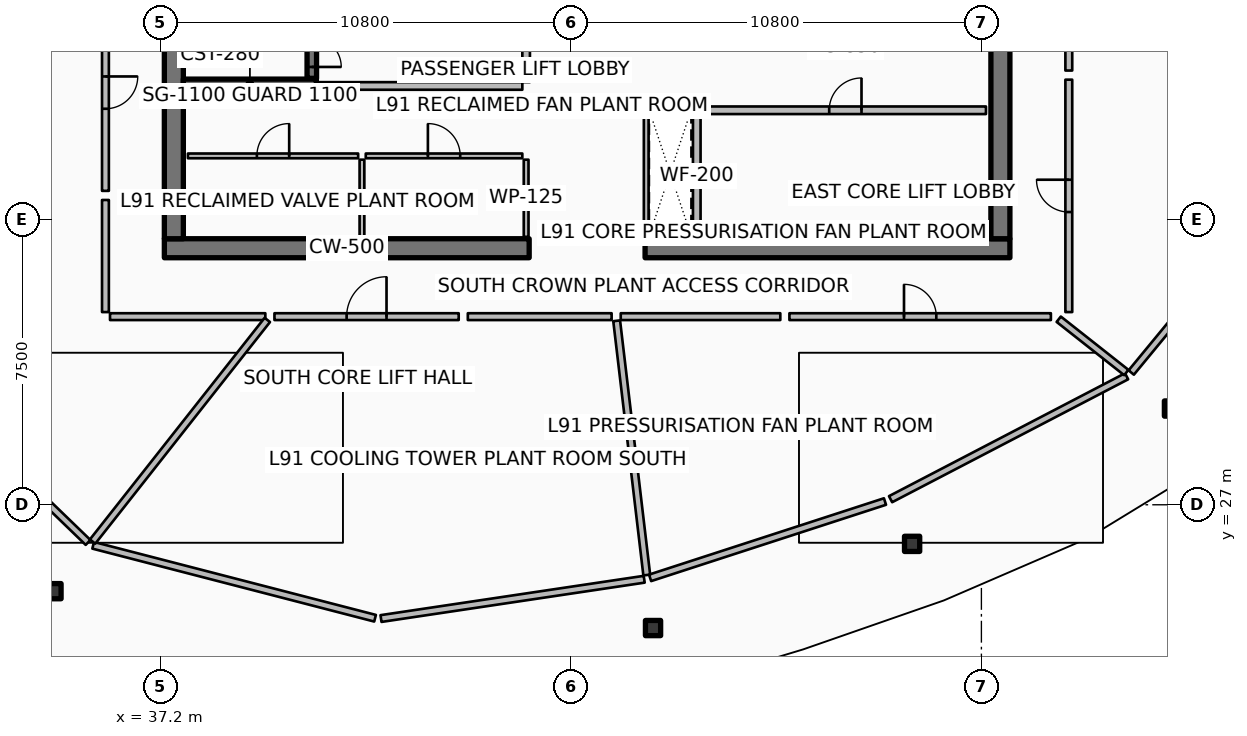
"""IFC4 building model, lengths in metres.
Left out: names, types, materials, properties, quantities, classifications, styles, units other than length and angle.
Written with IfcOpenShell. Run it as: python <this file> out.ifc"""

import sys

from ifc_helpers import new_model, si_unit, direction, frame, frame_2d, origin, origin_2d, place, context, subcontext, project, spatial, rectangle, hollow_rectangle, extrude, element, fill, save


model = new_model("IFC4")
c1 = context("Model", 3, precision=1e-05, world=origin(), true_north=direction((0.0, 1.0)))
c2 = subcontext(c1, "Body", "Model", "MODEL_VIEW")
j1 = project(units=[si_unit("LENGTHUNIT", "METRE"), si_unit("PLANEANGLEUNIT", "RADIAN")], contexts=[c1])
p1 = place(None, origin())
s1 = spatial("IfcSite", under=j1, at=p1, CompositionType="ELEMENT")
p2 = place(p1, origin())
s2 = spatial("IfcBuilding", under=s1, at=p2, CompositionType="ELEMENT")
p3 = place(p2, frame((0.0, 0.0, 363.2)))
s3 = spatial("IfcBuildingStorey", under=s2, at=p3, CompositionType="ELEMENT", Elevation=363.2)
p4 = place(p3, frame((37.3, 33.75, 0.0), z_axis=(0.0, 0.0, 1.0), x_axis=(1.0, 0.0, 0.0)))
e1 = element("IfcWall", 1, at=p4, inside=s3, PredefinedType="SHEAR", context=c2, shape_type="SweptSolid", body=[
    extrude(rectangle(XDim=9.6, YDim=0.5, at=frame_2d((4.8, 0.0))), origin(), (0.0, 0.0, 1.0), 3.6),
])
p5 = place(p3, frame((49.95, 33.75, 0.0), z_axis=(0.0, 0.0, 1.0), x_axis=(1.0, 0.0, 0.0)))
e2 = element("IfcWall", 2, at=p5, inside=s3, PredefinedType="SHEAR", context=c2, shape_type="SweptSolid", body=[
    extrude(rectangle(XDim=9.6, YDim=0.5, at=frame_2d((4.8, 0.0))), origin(), (0.0, 0.0, 1.0), 3.6),
])
for number, where, z_axis, x_axis in (
    (3, (37.55, 34.0, 0.0), (0.0, 0.0, 1.0), (0.0, 1.0, 0.0)),
    (4, (59.3, 34.0, 0.0), (0.0, 0.0, 1.0), (0.0, 1.0, 0.0)),
):
    element("IfcWall", number, at=place(p3, frame(where, z_axis=z_axis, x_axis=x_axis)), inside=s3, PredefinedType="SHEAR", context=c2, shape_type="SweptSolid", body=[
        extrude(rectangle(XDim=16.0, YDim=0.5, at=frame_2d((8.0, 0.0))), origin(), (0.0, 0.0, 1.0), 3.6),
    ])
p6 = place(p3, frame((37.8, 38.06, 0.0), z_axis=(0.0, 0.0, 1.0), x_axis=(1.0, 0.0, 0.0)))
e5 = element("IfcWall", 5, at=p6, inside=s3, PredefinedType="SHEAR", context=c2, shape_type="SweptSolid", body=[
    extrude(rectangle(XDim=3.5, YDim=0.28, at=frame_2d((1.75, 0.0))), origin(), (0.0, 0.0, 1.0), 3.6),
])
for number, where, z_axis, x_axis in (
    (6, (34.383, 24.726, 0.0), (0.0, 0.0, 1.0), (1.0, 0.0, 0.0)),
    (7, (50.159, 23.756, 0.0), (0.0, 0.0, 1.0), (1.0, 0.0, 0.0)),
    (8, (56.977, 25.971, 0.0), (0.0, 0.0, 1.0), (1.0, 0.0, 0.0)),
    (9, (63.815, 29.532, 0.0), (0.0, 0.0, 1.0), (1.0, 0.0, 0.0)),
):
    element("IfcColumn", number, at=place(p3, frame(where, z_axis=z_axis, x_axis=x_axis)), inside=s3, PredefinedType="COLUMN", context=c2, shape_type="SweptSolid", body=[
        extrude(hollow_rectangle(XDim=0.4, YDim=0.4, WallThickness=0.02, InnerFilletRadius=0.02, OuterFilletRadius=0.04, at=origin_2d()), origin(), (0.0, 0.0, 1.0), 3.32),
    ])
p7 = place(p3, frame((41.18, 38.22, 0.0), z_axis=(0.0, 0.0, 1.0), x_axis=(0.0, 1.0, 0.0)))
e10 = element("IfcWall", 10, at=p7, inside=s3, PredefinedType="SOLIDWALL", context=c2, shape_type="SweptSolid", body=[
    extrude(rectangle(XDim=7.56, YDim=0.25, at=frame_2d((3.78, 0.0))), origin(), (0.0, 0.0, 1.0), 3.32),
])
p8 = place(p7, frame((0.3, 0.0, 0.0)))
e11 = element("IfcOpeningElement", 11, at=p8, cuts=e10, PredefinedType="OPENING", context=c2, shape_type="SweptSolid", body=[
    extrude(rectangle(XDim=1.55, YDim=2.15, at=frame_2d((0.775, 1.075))), frame((0.0, 0.135, 0.0), z_axis=(0.0, -1.0, 0.0), x_axis=(1.0, 0.0, 0.0)), (0.0, 0.0, 1.0), 0.27),
])
p9 = place(p3, frame((51.52, 37.38, 0.0), z_axis=(0.0, 0.0, 1.0), x_axis=(1.0, 0.0, 0.0)))
e12 = element("IfcWall", 12, at=p9, inside=s3, PredefinedType="PARTITIONING", context=c2, shape_type="SweptSolid", body=[
    extrude(rectangle(XDim=7.4, YDim=0.2, at=frame_2d((3.7, 0.0))), origin(), (0.0, 0.0, 1.0), 3.32),
])
p10 = place(p9, frame((3.275, 0.0, 0.0)))
e13 = element("IfcOpeningElement", 13, at=p10, cuts=e12, PredefinedType="OPENING", context=c2, shape_type="SweptSolid", body=[
    extrude(rectangle(XDim=0.85, YDim=2.06, at=frame_2d((0.425, 1.03))), frame((0.0, 0.11, 0.0), z_axis=(0.0, -1.0, 0.0), x_axis=(1.0, 0.0, 0.0)), (0.0, 0.0, 1.0), 0.22),
])
p11 = place(p3, frame((51.31, 34.05, 0.0), z_axis=(0.0, 0.0, 1.0), x_axis=(0.0, 1.0, 0.0)))
e14 = element("IfcWall", 14, at=p11, inside=s3, PredefinedType="PARTITIONING", context=c2, shape_type="SweptSolid", body=[
    extrude(rectangle(XDim=3.21, YDim=0.2, at=frame_2d((1.605, 0.0))), origin(), (0.0, 0.0, 1.0), 3.32),
])
for number, where, z_axis, x_axis in (
    (15, (46.82, 34.05, 0.0), (0.0, 0.0, 1.0), (0.0, 1.0, 0.0)),
    (16, (42.5, 34.05, 0.0), (0.0, 0.0, 1.0), (0.0, 1.0, 0.0)),
):
    element("IfcWall", number, at=place(p3, frame(where, z_axis=z_axis, x_axis=x_axis)), inside=s3, PredefinedType="PARTITIONING", context=c2, shape_type="SweptSolid", body=[
        extrude(rectangle(XDim=2.03, YDim=0.125, at=frame_2d((1.015, 0.0))), origin(), (0.0, 0.0, 1.0), 2.76),
    ])
p12 = place(p3, frame((37.92, 36.18, 0.0), z_axis=(0.0, 0.0, 1.0), x_axis=(1.0, 0.0, 0.0)))
e17 = element("IfcWall", 17, at=p12, inside=s3, PredefinedType="PARTITIONING", context=c2, shape_type="SweptSolid", body=[
    extrude(rectangle(XDim=4.48, YDim=0.125, at=frame_2d((2.24, 0.0))), origin(), (0.0, 0.0, 1.0), 2.76),
])
p13 = place(p12, frame((1.815, 0.0, 0.0)))
e18 = element("IfcOpeningElement", 18, at=p13, cuts=e17, PredefinedType="OPENING", context=c2, shape_type="SweptSolid", body=[
    extrude(rectangle(XDim=0.85, YDim=2.06, at=frame_2d((0.425, 1.03))), frame((0.0, 0.073, 0.0), z_axis=(0.0, -1.0, 0.0), x_axis=(1.0, 0.0, 0.0)), (0.0, 0.0, 1.0), 0.145),
])
p14 = place(p3, frame((42.6, 36.18, 0.0), z_axis=(0.0, 0.0, 1.0), x_axis=(1.0, 0.0, 0.0)))
e19 = element("IfcWall", 19, at=p14, inside=s3, PredefinedType="PARTITIONING", context=c2, shape_type="SweptSolid", body=[
    extrude(rectangle(XDim=4.12, YDim=0.125, at=frame_2d((2.06, 0.0))), origin(), (0.0, 0.0, 1.0), 2.76),
])
p15 = place(p14, frame((1.635, 0.0, 0.0)))
e20 = element("IfcOpeningElement", 20, at=p15, cuts=e19, PredefinedType="OPENING", context=c2, shape_type="SweptSolid", body=[
    extrude(rectangle(XDim=0.85, YDim=2.06, at=frame_2d((0.425, 1.03))), frame((0.0, 0.073, 0.0), z_axis=(0.0, -1.0, 0.0), x_axis=(1.0, 0.0, 0.0)), (0.0, 0.0, 1.0), 0.145),
])
p16 = place(p3, frame((41.35, 38.02, 0.0), z_axis=(0.0, 0.0, 1.0), x_axis=(1.0, 0.0, 0.0)))
e21 = element("IfcWall", 21, at=p16, inside=s3, PredefinedType="PARTITIONING", context=c2, shape_type="SweptSolid", body=[
    extrude(rectangle(XDim=5.37, YDim=0.2, at=frame_2d((2.685, 0.0))), origin(), (0.0, 0.0, 1.0), 3.32),
])
p17 = place(p3, frame((46.82, 38.12, 0.0), z_axis=(0.0, 0.0, 1.0), x_axis=(0.0, 1.0, 0.0)))
e22 = element("IfcWall", 22, at=p17, inside=s3, PredefinedType="PARTITIONING", context=c2, shape_type="SweptSolid", body=[
    extrude(rectangle(XDim=3.26, YDim=0.2, at=frame_2d((1.63, 0.0))), origin(), (0.0, 0.0, 1.0), 3.32),
])
p18 = place(p17, frame((1.105, 0.0, 0.0)))
e23 = element("IfcOpeningElement", 23, at=p18, cuts=e22, PredefinedType="OPENING", context=c2, shape_type="SweptSolid", body=[
    extrude(rectangle(XDim=1.05, YDim=2.1, at=frame_2d((0.525, 1.05))), frame((0.0, 0.11, 0.0), z_axis=(0.0, -1.0, 0.0), x_axis=(1.0, 0.0, 0.0)), (0.0, 0.0, 1.0), 0.22),
])
p19 = place(p3, frame((49.98, 34.06, 0.0), z_axis=(0.0, 0.0, 1.0), x_axis=(0.0, 1.0, 0.0)))
e24 = element("IfcWall", 24, at=p19, inside=s3, PredefinedType="PARTITIONING", context=c2, shape_type="SweptSolid", body=[
    extrude(rectangle(XDim=3.4, YDim=0.125, at=frame_2d((1.7, 0.0))), origin(), (0.0, 0.0, 1.0), 2.76),
])
p20 = place(p3, frame((49.98, 37.44, 0.0), z_axis=(0.0, 0.0, 1.0), x_axis=(1.0, 0.0, 0.0)))
e25 = element("IfcWall", 25, at=p20, inside=s3, PredefinedType="PARTITIONING", context=c2, shape_type="SweptSolid", body=[
    extrude(rectangle(XDim=1.26, YDim=0.125, at=frame_2d((0.63, 0.0))), origin(), (0.0, 0.0, 1.0), 2.76),
])
p21 = place(p3, frame((29.533, 31.57, 0.0), z_axis=(0.0, 0.0, 1.0), x_axis=(0.719364153135, -0.694633151516, 0.0)))
e26 = element("IfcWall", 26, at=p21, inside=s3, PredefinedType="PARTITIONING", context=c2, shape_type="SweptSolid", body=[
    extrude(rectangle(XDim=8.006, YDim=0.18, at=frame_2d((4.003, 0.0))), origin(), (0.0, 0.0, 1.0), 2.76),
])
p22 = place(p3, frame((35.427, 25.934, 0.0), z_axis=(0.0, 0.0, 1.0), x_axis=(0.968117205342, -0.250497658115, 0.0)))
e27 = element("IfcWall", 27, at=p22, inside=s3, PredefinedType="PARTITIONING", context=c2, shape_type="SweptSolid", body=[
    extrude(rectangle(XDim=7.662, YDim=0.18, at=frame_2d((3.831, 0.0))), origin(), (0.0, 0.0, 1.0), 2.76),
])
p23 = place(p3, frame((43.001, 24.006, 0.0), z_axis=(0.0, 0.0, 1.0), x_axis=(0.989034336252, 0.147685753256, 0.0)))
e28 = element("IfcWall", 28, at=p23, inside=s3, PredefinedType="PARTITIONING", context=c2, shape_type="SweptSolid", body=[
    extrude(rectangle(XDim=7.003, YDim=0.18, at=frame_2d((3.501, 0.0))), origin(), (0.0, 0.0, 1.0), 2.76),
])
p24 = place(p3, frame((50.082, 25.077, 0.0), z_axis=(0.0, 0.0, 1.0), x_axis=(0.95105283999, 0.309028308649, 0.0)))
e29 = element("IfcWall", 29, at=p24, inside=s3, PredefinedType="PARTITIONING", context=c2, shape_type="SweptSolid", body=[
    extrude(rectangle(XDim=6.499, YDim=0.18, at=frame_2d((3.25, 0.0))), origin(), (0.0, 0.0, 1.0), 2.76),
])
p25 = place(p3, frame((56.41, 27.147, 0.0), z_axis=(0.0, 0.0, 1.0), x_axis=(0.886949494865, 0.461866423935, 0.0)))
e30 = element("IfcWall", 30, at=p25, inside=s3, PredefinedType="PARTITIONING", context=c2, shape_type="SweptSolid", body=[
    extrude(rectangle(XDim=7.002, YDim=0.18, at=frame_2d((3.501, 0.0))), origin(), (0.0, 0.0, 1.0), 2.76),
])
p26 = place(p3, frame((62.742, 30.48, 0.0), z_axis=(0.0, 0.0, 1.0), x_axis=(0.636018833443, 0.771673534278, 0.0)))
e31 = element("IfcWall", 31, at=p26, inside=s3, PredefinedType="PARTITIONING", context=c2, shape_type="SweptSolid", body=[
    extrude(rectangle(XDim=7.661, YDim=0.18, at=frame_2d((3.831, 0.0))), origin(), (0.0, 0.0, 1.0), 2.76),
])
p27 = place(p3, frame((35.75, 40.43, 0.0), z_axis=(0.0, 0.0, 1.0), x_axis=(0.0, -1.0, 0.0)))
e32 = element("IfcWall", 32, at=p27, inside=s3, PredefinedType="PARTITIONING", context=c2, shape_type="SweptSolid", body=[
    extrude(rectangle(XDim=5.17, YDim=0.18, at=frame_2d((2.585, 0.0))), origin(), (0.0, 0.0, 1.0), 2.76),
])
p28 = place(p27, frame((2.16, 0.0, 0.0)))
e33 = element("IfcOpeningElement", 33, at=p28, cuts=e32, PredefinedType="OPENING", context=c2, shape_type="SweptSolid", body=[
    extrude(rectangle(XDim=0.85, YDim=2.06, at=frame_2d((0.425, 1.03))), frame((0.0, 0.1, 0.0), z_axis=(0.0, -1.0, 0.0), x_axis=(1.0, 0.0, 0.0)), (0.0, 0.0, 1.0), 0.2),
])
p29 = place(p3, frame((35.75, 35.02, 0.0), z_axis=(0.0, 0.0, 1.0), x_axis=(0.0, -1.0, 0.0)))
e34 = element("IfcWall", 34, at=p29, inside=s3, PredefinedType="PARTITIONING", context=c2, shape_type="SweptSolid", body=[
    extrude(rectangle(XDim=2.95, YDim=0.18, at=frame_2d((1.475, 0.0))), origin(), (0.0, 0.0, 1.0), 2.76),
])
p30 = place(p3, frame((35.87, 31.95, 0.0), z_axis=(0.0, 0.0, 1.0), x_axis=(1.0, 0.0, 0.0)))
e35 = element("IfcWall", 35, at=p30, inside=s3, PredefinedType="PARTITIONING", context=c2, shape_type="SweptSolid", body=[
    extrude(rectangle(XDim=4.087, YDim=0.18, at=frame_2d((2.043, 0.0))), origin(), (0.0, 0.0, 1.0), 2.76),
])
p31 = place(p3, frame((40.009, 31.864, 0.0), z_axis=(0.0, 0.0, 1.0), x_axis=(-0.619089811342, -0.785320192974, 0.0)))
e36 = element("IfcWall", 36, at=p31, inside=s3, PredefinedType="PARTITIONING", context=c2, shape_type="SweptSolid", body=[
    extrude(rectangle(XDim=7.426, YDim=0.18, at=frame_2d((3.713, 0.0))), origin(), (0.0, 0.0, 1.0), 2.76),
])
p32 = place(p3, frame((40.197, 31.95, 0.0), z_axis=(0.0, 0.0, 1.0), x_axis=(1.0, 0.0, 0.0)))
e37 = element("IfcWall", 37, at=p32, inside=s3, PredefinedType="PARTITIONING", context=c2, shape_type="SweptSolid", body=[
    extrude(rectangle(XDim=4.848, YDim=0.18, at=frame_2d((2.424, 0.0))), origin(), (0.0, 0.0, 1.0), 2.76),
])
p33 = place(p32, frame((1.899, 0.0, 0.0)))
e38 = element("IfcOpeningElement", 38, at=p33, cuts=e37, PredefinedType="OPENING", context=c2, shape_type="SweptSolid", body=[
    extrude(rectangle(XDim=1.05, YDim=2.1, at=frame_2d((0.525, 1.05))), frame((0.0, 0.1, 0.0), z_axis=(0.0, -1.0, 0.0), x_axis=(1.0, 0.0, 0.0)), (0.0, 0.0, 1.0), 0.2),
])
p34 = place(p3, frame((45.286, 31.95, 0.0), z_axis=(0.0, 0.0, 1.0), x_axis=(1.0, 0.0, 0.0)))
e39 = element("IfcWall", 39, at=p34, inside=s3, PredefinedType="PARTITIONING", context=c2, shape_type="SweptSolid", body=[
    extrude(rectangle(XDim=3.784, YDim=0.18, at=frame_2d((1.892, 0.0))), origin(), (0.0, 0.0, 1.0), 2.76),
])
p35 = place(p3, frame((49.202, 31.841, 0.0), z_axis=(0.0, 0.0, 1.0), x_axis=(0.117541495417, -0.993067971921, 0.0)))
e40 = element("IfcWall", 40, at=p35, inside=s3, PredefinedType="PARTITIONING", context=c2, shape_type="SweptSolid", body=[
    extrude(rectangle(XDim=6.736, YDim=0.18, at=frame_2d((3.368, 0.0))), origin(), (0.0, 0.0, 1.0), 2.76),
])
p36 = place(p3, frame((49.31, 31.95, 0.0), z_axis=(0.0, 0.0, 1.0), x_axis=(1.0, 0.0, 0.0)))
e41 = element("IfcWall", 41, at=p36, inside=s3, PredefinedType="PARTITIONING", context=c2, shape_type="SweptSolid", body=[
    extrude(rectangle(XDim=4.199, YDim=0.18, at=frame_2d((2.099, 0.0))), origin(), (0.0, 0.0, 1.0), 2.76),
])
p37 = place(p3, frame((53.748, 31.95, 0.0), z_axis=(0.0, 0.0, 1.0), x_axis=(1.0, 0.0, 0.0)))
e42 = element("IfcWall", 42, at=p37, inside=s3, PredefinedType="PARTITIONING", context=c2, shape_type="SweptSolid", body=[
    extrude(rectangle(XDim=6.88, YDim=0.18, at=frame_2d((3.44, 0.0))), origin(), (0.0, 0.0, 1.0), 2.76),
])
p38 = place(p37, frame((3.015, 0.0, 0.0)))
e43 = element("IfcOpeningElement", 43, at=p38, cuts=e42, PredefinedType="OPENING", context=c2, shape_type="SweptSolid", body=[
    extrude(rectangle(XDim=0.85, YDim=2.06, at=frame_2d((0.425, 1.03))), frame((0.0, 0.1, 0.0), z_axis=(0.0, -1.0, 0.0), x_axis=(1.0, 0.0, 0.0)), (0.0, 0.0, 1.0), 0.2),
])
p39 = place(p3, frame((60.835, 31.882, 0.0), z_axis=(0.0, 0.0, 1.0), x_axis=(0.785329646864, -0.619077818821, 0.0)))
e44 = element("IfcWall", 44, at=p39, inside=s3, PredefinedType="PARTITIONING", context=c2, shape_type="SweptSolid", body=[
    extrude(rectangle(XDim=2.264, YDim=0.18, at=frame_2d((1.132, 0.0))), origin(), (0.0, 0.0, 1.0), 2.76),
])
p40 = place(p3, frame((61.1, 32.07, 0.0), z_axis=(0.0, 0.0, 1.0), x_axis=(0.0, 1.0, 0.0)))
e45 = element("IfcWall", 45, at=p40, inside=s3, PredefinedType="PARTITIONING", context=c2, shape_type="SweptSolid", body=[
    extrude(rectangle(XDim=6.115, YDim=0.18, at=frame_2d((3.058, 0.0))), origin(), (0.0, 0.0, 1.0), 2.76),
])
p41 = place(p40, frame((2.633, 0.0, 0.0)))
e46 = element("IfcOpeningElement", 46, at=p41, cuts=e45, PredefinedType="OPENING", context=c2, shape_type="SweptSolid", body=[
    extrude(rectangle(XDim=0.85, YDim=2.06, at=frame_2d((0.425, 1.03))), frame((0.0, 0.1, 0.0), z_axis=(0.0, -1.0, 0.0), x_axis=(1.0, 0.0, 0.0)), (0.0, 0.0, 1.0), 0.2),
])
p42 = place(p3, frame((61.1, 38.425, 0.0), z_axis=(0.0, 0.0, 1.0), x_axis=(0.0, 1.0, 0.0)))
e47 = element("IfcWall", 47, at=p42, inside=s3, PredefinedType="PARTITIONING", context=c2, shape_type="SweptSolid", body=[
    extrude(rectangle(XDim=5.005, YDim=0.18, at=frame_2d((2.502, 0.0))), origin(), (0.0, 0.0, 1.0), 2.76),
])
p43 = place(p8, origin())
e48 = element("IfcDoor", 48, at=p43, inside=s3, OperationType="DOUBLE_DOOR_SINGLE_SWING", PredefinedType="DOOR", context=c2, shape_type="SweptSolid", body=[
    extrude(rectangle(XDim=1.55, YDim=2.15, at=frame_2d((0.775, 1.075))), frame((0.0, 0.025, 0.0), z_axis=(0.0, -1.0, 0.0), x_axis=(1.0, 0.0, 0.0)), (0.0, 0.0, 1.0), 0.05),
])
fill(e11, e48)
p44 = place(p10, origin())
e49 = element("IfcDoor", 49, at=p44, inside=s3, OperationType="SINGLE_SWING_RIGHT", PredefinedType="DOOR", context=c2, shape_type="SweptSolid", body=[
    extrude(rectangle(XDim=0.85, YDim=2.06, at=frame_2d((0.425, 1.03))), frame((0.0, 0.025, 0.0), z_axis=(0.0, -1.0, 0.0), x_axis=(1.0, 0.0, 0.0)), (0.0, 0.0, 1.0), 0.05),
])
fill(e13, e49)
p45 = place(p13, origin())
e50 = element("IfcDoor", 50, at=p45, inside=s3, OperationType="SINGLE_SWING_RIGHT", PredefinedType="DOOR", context=c2, shape_type="SweptSolid", body=[
    extrude(rectangle(XDim=0.85, YDim=2.06, at=frame_2d((0.425, 1.03))), frame((0.0, 0.025, 0.0), z_axis=(0.0, -1.0, 0.0), x_axis=(1.0, 0.0, 0.0)), (0.0, 0.0, 1.0), 0.05),
])
fill(e18, e50)
p46 = place(p15, origin())
e51 = element("IfcDoor", 51, at=p46, inside=s3, OperationType="SINGLE_SWING_LEFT", PredefinedType="DOOR", context=c2, shape_type="SweptSolid", body=[
    extrude(rectangle(XDim=0.85, YDim=2.06, at=frame_2d((0.425, 1.03))), frame((0.0, 0.025, 0.0), z_axis=(0.0, -1.0, 0.0), x_axis=(1.0, 0.0, 0.0)), (0.0, 0.0, 1.0), 0.05),
])
fill(e20, e51)
p47 = place(p28, origin())
e52 = element("IfcDoor", 52, at=p47, inside=s3, OperationType="SINGLE_SWING_LEFT", PredefinedType="DOOR", context=c2, shape_type="SweptSolid", body=[
    extrude(rectangle(XDim=0.85, YDim=2.06, at=frame_2d((0.425, 1.03))), frame((0.0, 0.025, 0.0), z_axis=(0.0, -1.0, 0.0), x_axis=(1.0, 0.0, 0.0)), (0.0, 0.0, 1.0), 0.05),
])
fill(e33, e52)
p48 = place(p33, origin())
e53 = element("IfcDoor", 53, at=p48, inside=s3, OperationType="SINGLE_SWING_RIGHT", PredefinedType="DOOR", context=c2, shape_type="SweptSolid", body=[
    extrude(rectangle(XDim=1.05, YDim=2.1, at=frame_2d((0.525, 1.05))), frame((0.0, 0.025, 0.0), z_axis=(0.0, -1.0, 0.0), x_axis=(1.0, 0.0, 0.0)), (0.0, 0.0, 1.0), 0.05),
])
fill(e38, e53)
p49 = place(p38, origin())
e54 = element("IfcDoor", 54, at=p49, inside=s3, OperationType="SINGLE_SWING_LEFT", PredefinedType="DOOR", context=c2, shape_type="SweptSolid", body=[
    extrude(rectangle(XDim=0.85, YDim=2.06, at=frame_2d((0.425, 1.03))), frame((0.0, 0.025, 0.0), z_axis=(0.0, -1.0, 0.0), x_axis=(1.0, 0.0, 0.0)), (0.0, 0.0, 1.0), 0.05),
])
fill(e43, e54)
p50 = place(p41, origin())
e55 = element("IfcDoor", 55, at=p50, inside=s3, OperationType="SINGLE_SWING_RIGHT", PredefinedType="DOOR", context=c2, shape_type="SweptSolid", body=[
    extrude(rectangle(XDim=0.85, YDim=2.06, at=frame_2d((0.425, 1.03))), frame((0.0, 0.025, 0.0), z_axis=(0.0, -1.0, 0.0), x_axis=(1.0, 0.0, 0.0)), (0.0, 0.0, 1.0), 0.05),
])
fill(e46, e55)
save(model, sys.argv[1])
